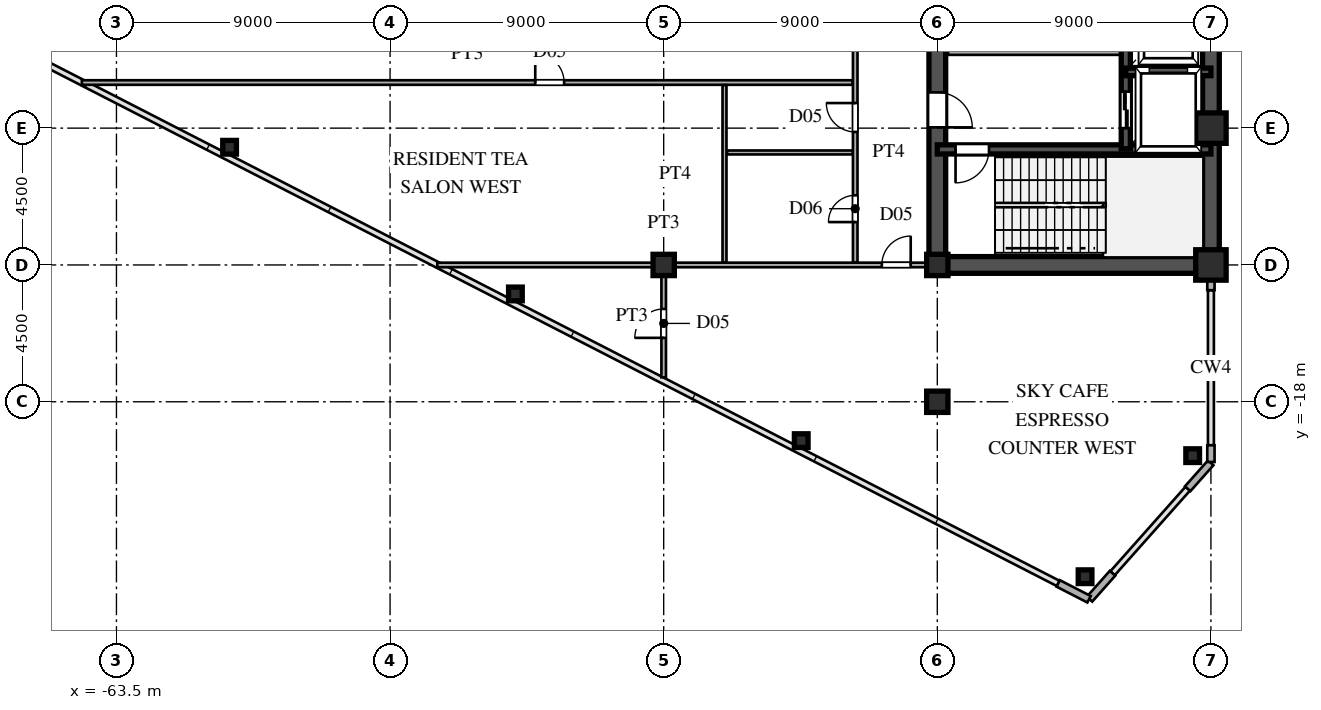
"""IFC4 building model, lengths in metres.
Left out: names, types, materials, properties, quantities, classifications, styles, units other than length and angle.
Written with IfcOpenShell. Run it as: python <this file> out.ifc"""

import sys

from ifc_helpers import new_model, si_unit, direction, frame, frame_2d, origin, origin_2d, place, context, subcontext, project, spatial, rectangle, hollow_rectangle, i_section, extrude, source, transform, mapped, element, fill, save


model = new_model("IFC4")
c1 = context("Model", 3, precision=1e-05, world=origin(), true_north=direction((0.0, 1.0)))
c2 = subcontext(c1, "Body", "Model", "MODEL_VIEW")
j1 = project(units=[si_unit("LENGTHUNIT", "METRE"), si_unit("PLANEANGLEUNIT", "RADIAN")], contexts=[c1])
p1 = place(None, origin())
s1 = spatial("IfcSite", under=j1, at=p1, CompositionType="ELEMENT")
p2 = place(p1, origin())
s2 = spatial("IfcBuilding", under=s1, at=p2, CompositionType="ELEMENT")
p3 = place(p2, frame((0.0, 0.0, 135.6)))
s3 = spatial("IfcBuildingStorey", under=s2, at=p3, CompositionType="ELEMENT", Elevation=135.6)
m1 = source(origin(), c2, "Body", "SweptSolid", [
    extrude(hollow_rectangle(XDim=1.0, YDim=1.0, WallThickness=0.042, at=origin_2d()), origin(), (0.0, 0.0, 1.0), 4.8),
])
for number, where, z_axis, x_axis in (
    (1, (-27.5, -13.5, 0.0), (0.0, 0.0, 1.0), (1.0, 0.0, 0.0)),
    (2, (-27.5, -9.0, 0.0), (0.0, 0.0, 1.0), (1.0, 0.0, 0.0)),
):
    element("IfcColumn", number, at=place(p3, frame(where, z_axis=z_axis, x_axis=x_axis)), inside=s3, PredefinedType="COLUMN", context=c2, shape_type="MappedRepresentation", body=[
        mapped(m1, transform((0.0, 0.0, 0.0), scale=1.0)),
    ])
m2 = source(origin(), c2, "Body", "SweptSolid", [
    extrude(i_section(OverallWidth=0.7, OverallDepth=0.7, WebThickness=0.028, FlangeThickness=0.045, at=origin_2d()), origin(), (0.0, 0.0, 1.0), 4.8),
])
for number, where, z_axis, x_axis in (
    (3, (-36.5, -18.0, 0.0), (0.0, 0.0, 1.0), (1.0, 0.0, 0.0)),
    (4, (-36.5, -13.5, 0.0), (0.0, 0.0, 1.0), (1.0, 0.0, 0.0)),
    (5, (-45.5, -13.5, 0.0), (0.0, 0.0, 1.0), (1.0, 0.0, 0.0)),
):
    element("IfcColumn", number, at=place(p3, frame(where, z_axis=z_axis, x_axis=x_axis)), inside=s3, PredefinedType="COLUMN", context=c2, shape_type="MappedRepresentation", body=[
        mapped(m2, transform((0.0, 0.0, 0.0), scale=1.0)),
    ])
m3 = source(origin(), c2, "Body", "SweptSolid", [
    extrude(hollow_rectangle(XDim=0.45, YDim=0.45, WallThickness=0.018, at=origin_2d()), origin(), (0.0, 0.0, 1.0), 4.8),
])
for number, where, z_axis, x_axis in (
    (6, (-28.1, -19.772, 0.0), (0.0, 0.0, 1.0), (1.0, 0.0, 0.0)),
    (7, (-31.64, -23.754, 0.0), (0.0, 0.0, 1.0), (1.0, 0.0, 0.0)),
    (8, (-40.976, -19.278, 0.0), (0.0, 0.0, 1.0), (1.0, 0.0, 0.0)),
    (9, (-50.377, -14.453, 0.0), (0.0, 0.0, 1.0), (1.0, 0.0, 0.0)),
    (10, (-59.779, -9.629, 0.0), (0.0, 0.0, 1.0), (1.0, 0.0, 0.0)),
):
    element("IfcColumn", number, at=place(p3, frame(where, z_axis=z_axis, x_axis=x_axis)), inside=s3, PredefinedType="COLUMN", context=c2, shape_type="MappedRepresentation", body=[
        mapped(m3, transform((0.0, 0.0, 0.0), scale=1.0)),
    ])
p4 = place(p3, frame((-27.5, -19.98, 0.0), z_axis=(0.0, 0.0, 1.0), x_axis=(0.0, 1.0, 0.0)))
e11 = element("IfcWall", 11, at=p4, inside=s3, PredefinedType="SOLIDWALL", context=c2, shape_type="SweptSolid", body=[
    extrude(rectangle(XDim=0.55, YDim=0.24, at=frame_2d((0.275, 0.0))), origin(), (0.0, 0.0, 1.0), 4.58),
])
p5 = place(p3, frame((-27.5, -14.33, 0.0), z_axis=(0.0, 0.0, 1.0), x_axis=(0.0, 1.0, 0.0)))
e12 = element("IfcWall", 12, at=p5, inside=s3, PredefinedType="SOLIDWALL", context=c2, shape_type="SweptSolid", body=[
    extrude(rectangle(XDim=0.55, YDim=0.24, at=frame_2d((0.275, 0.0))), origin(), (0.0, 0.0, 1.0), 4.08),
])
p6 = place(p3, frame((-32.523, -23.975, 0.0), z_axis=(0.0, 0.0, 1.0), x_axis=(0.889797395748, -0.456355776255, 0.0)))
e13 = element("IfcWall", 13, at=p6, inside=s3, PredefinedType="SOLIDWALL", context=c2, shape_type="SweptSolid", body=[
    extrude(rectangle(XDim=1.14, YDim=0.24, at=frame_2d((0.57, 0.0))), origin(), (0.0, 0.0, 1.0), 4.58),
])
for number, where, z_axis, x_axis in (
    (14, (-31.493, -24.492, 0.0), (0.0, 0.0, 1.0), (0.664, 0.747, 0.0)),
    (15, (-28.264, -20.86, 0.0), (0.0, 0.0, 1.0), (0.664, 0.747, 0.0)),
):
    element("IfcWall", number, at=place(p3, frame(where, z_axis=z_axis, x_axis=x_axis)), inside=s3, PredefinedType="SOLIDWALL", context=c2, shape_type="SweptSolid", body=[
        extrude(rectangle(XDim=1.14, YDim=0.24, at=frame_2d((0.57, 0.0))), origin(), (0.0, 0.0, 1.0), 4.58),
    ])
p7 = place(p3, frame((-27.5, -13.5, 0.0), z_axis=(0.0, 0.0, 1.0), x_axis=(0.0, 1.0, 0.0)))
e16 = element("IfcWall", 16, at=p7, inside=s3, PredefinedType="SHEAR", context=c2, shape_type="SweptSolid", body=[
    extrude(rectangle(XDim=12.2, YDim=0.55, at=frame_2d((6.1, 0.0))), origin(), (0.0, 0.0, 1.0), 4.58),
])
p8 = place(p3, frame((-36.5, -13.5, 0.0), z_axis=(0.0, 0.0, 1.0), x_axis=(1.0, 0.0, 0.0)))
e17 = element("IfcWall", 17, at=p8, inside=s3, PredefinedType="SHEAR", context=c2, shape_type="SweptSolid", body=[
    extrude(rectangle(XDim=9.0, YDim=0.55, at=frame_2d((4.5, 0.0))), origin(), (0.0, 0.0, 1.0), 4.58),
])
p9 = place(p3, frame((-36.5, -13.65, 0.0), z_axis=(0.0, 0.0, 1.0), x_axis=(0.0, 1.0, 0.0)))
e18 = element("IfcWall", 18, at=p9, inside=s3, PredefinedType="SHEAR", context=c2, shape_type="SweptSolid", body=[
    extrude(rectangle(XDim=7.15, YDim=0.55, at=frame_2d((3.575, 0.0))), origin(), (0.0, 0.0, 1.0), 4.58),
])
p10 = place(p9, frame((4.675, 0.0, 0.0)))
e19 = element("IfcOpeningElement", 19, at=p10, cuts=e18, PredefinedType="OPENING", context=c2, shape_type="SweptSolid", body=[
    extrude(rectangle(XDim=1.15, YDim=2.2, at=frame_2d((0.575, 1.1))), frame((0.0, 0.285, 0.0), z_axis=(0.0, -1.0, 0.0), x_axis=(1.0, 0.0, 0.0)), (0.0, 0.0, 1.0), 0.57),
])
p11 = place(p3, frame((-36.5, -9.7, 0.0), z_axis=(0.0, 0.0, 1.0), x_axis=(1.0, 0.0, 0.0)))
e20 = element("IfcWall", 20, at=p11, inside=s3, PredefinedType="SHEAR", context=c2, shape_type="SweptSolid", body=[
    extrude(rectangle(XDim=9.0, YDim=0.3, at=frame_2d((4.5, 0.0))), origin(), (0.0, 0.0, 1.0), 4.58),
])
p12 = place(p11, frame((0.6, 0.0, 0.0)))
e21 = element("IfcOpeningElement", 21, at=p12, cuts=e20, PredefinedType="OPENING", context=c2, shape_type="SweptSolid", body=[
    extrude(rectangle(XDim=1.1, YDim=2.2, at=frame_2d((0.55, 1.1))), frame((0.0, 0.16, 0.0), z_axis=(0.0, -1.0, 0.0), x_axis=(1.0, 0.0, 0.0)), (0.0, 0.0, 1.0), 0.32),
])
p13 = place(p3, frame((-30.3, -7.15, 0.0), z_axis=(0.0, 0.0, 1.0), x_axis=(1.0, 0.0, 0.0)))
e22 = element("IfcWall", 22, at=p13, inside=s3, PredefinedType="SHEAR", context=c2, shape_type="SweptSolid", body=[
    extrude(rectangle(XDim=2.8, YDim=0.25, at=frame_2d((1.4, 0.0))), origin(), (0.0, 0.0, 1.0), 4.58),
])
p14 = place(p3, frame((-30.3, -9.68, 0.0), z_axis=(0.0, 0.0, 1.0), x_axis=(0.0, 1.0, 0.0)))
e23 = element("IfcWall", 23, at=p14, inside=s3, PredefinedType="SHEAR", context=c2, shape_type="SweptSolid", body=[
    extrude(rectangle(XDim=2.56, YDim=0.3, at=frame_2d((1.28, 0.0))), origin(), (0.0, 0.0, 1.0), 4.58),
])
p15 = place(p14, frame((0.68, 0.0, 0.0)))
e24 = element("IfcOpeningElement", 24, at=p15, cuts=e23, PredefinedType="OPENING", context=c2, shape_type="SweptSolid", body=[
    extrude(rectangle(XDim=1.2, YDim=2.25, at=frame_2d((0.6, 1.125))), frame((0.0, 0.16, 0.0), z_axis=(0.0, -1.0, 0.0), x_axis=(1.0, 0.0, 0.0)), (0.0, 0.0, 1.0), 0.32),
])
p16 = place(p3, frame((-30.3, -7.12, 0.0), z_axis=(0.0, 0.0, 1.0), x_axis=(0.0, 1.0, 0.0)))
e25 = element("IfcWall", 25, at=p16, inside=s3, PredefinedType="SHEAR", context=c2, shape_type="SweptSolid", body=[
    extrude(rectangle(XDim=2.92, YDim=0.3, at=frame_2d((1.46, 0.0))), origin(), (0.0, 0.0, 1.0), 4.58),
])
p17 = place(p16, frame((0.91, 0.0, 0.0)))
e26 = element("IfcOpeningElement", 26, at=p17, cuts=e25, PredefinedType="OPENING", context=c2, shape_type="SweptSolid", body=[
    extrude(rectangle(XDim=1.1, YDim=2.2, at=frame_2d((0.55, 1.1))), frame((0.0, 0.16, 0.0), z_axis=(0.0, -1.0, 0.0), x_axis=(1.0, 0.0, 0.0)), (0.0, 0.0, 1.0), 0.32),
])
p18 = place(p3, frame((-36.15, -6.5, 0.0), z_axis=(0.0, 0.0, 1.0), x_axis=(1.0, 0.0, 0.0)))
e27 = element("IfcWall", 27, at=p18, inside=s3, PredefinedType="PARTITIONING", context=c2, shape_type="SweptSolid", body=[
    extrude(rectangle(XDim=5.7, YDim=0.18, at=frame_2d((2.85, 0.0))), origin(), (0.0, 0.0, 1.0), 4.58),
])
p19 = place(p3, frame((-52.947, -13.5, 0.0), z_axis=(0.0, 0.0, 1.0), x_axis=(1.0, 0.0, 0.0)))
e28 = element("IfcWall", 28, at=p19, inside=s3, PredefinedType="PARTITIONING", context=c2, shape_type="SweptSolid", body=[
    extrude(rectangle(XDim=16.167, YDim=0.15, at=frame_2d((8.083, 0.0))), origin(), (0.0, 0.0, 1.0), 3.98),
])
p20 = place(p19, frame((14.622, 0.0, 0.0)))
e29 = element("IfcOpeningElement", 29, at=p20, cuts=e28, PredefinedType="OPENING", context=c2, shape_type="SweptSolid", body=[
    extrude(rectangle(XDim=0.95, YDim=2.15, at=frame_2d((0.475, 1.075))), frame((0.0, 0.085, 0.0), z_axis=(0.0, -1.0, 0.0), x_axis=(1.0, 0.0, 0.0)), (0.0, 0.0, 1.0), 0.17),
])
p21 = place(p3, frame((-43.415, -9.8, 0.0), z_axis=(0.0, 0.0, 1.0), x_axis=(1.0, 0.0, 0.0)))
e30 = element("IfcWall", 30, at=p21, inside=s3, PredefinedType="PARTITIONING", context=c2, shape_type="SweptSolid", body=[
    extrude(rectangle(XDim=4.13, YDim=0.13, at=frame_2d((2.065, 0.0))), origin(), (0.0, 0.0, 1.0), 4.58),
])
p22 = place(p3, frame((-64.639, -7.5, 0.0), z_axis=(0.0, 0.0, 1.0), x_axis=(1.0, 0.0, 0.0)))
e31 = element("IfcWall", 31, at=p22, inside=s3, PredefinedType="PARTITIONING", context=c2, shape_type="SweptSolid", body=[
    extrude(rectangle(XDim=25.354, YDim=0.15, at=frame_2d((12.677, 0.0))), origin(), (0.0, 0.0, 1.0), 4.58),
])
p23 = place(p22, frame((14.914, 0.0, 0.0)))
e32 = element("IfcOpeningElement", 32, at=p23, cuts=e31, PredefinedType="OPENING", context=c2, shape_type="SweptSolid", body=[
    extrude(rectangle(XDim=0.95, YDim=2.15, at=frame_2d((0.475, 1.075))), frame((0.0, 0.085, 0.0), z_axis=(0.0, -1.0, 0.0), x_axis=(1.0, 0.0, 0.0)), (0.0, 0.0, 1.0), 0.17),
])
p24 = place(p3, frame((-45.5, -17.196, 0.0), z_axis=(0.0, 0.0, 1.0), x_axis=(0.0, 1.0, 0.0)))
e33 = element("IfcWall", 33, at=p24, inside=s3, PredefinedType="PARTITIONING", context=c2, shape_type="SweptSolid", body=[
    extrude(rectangle(XDim=3.611, YDim=0.15, at=frame_2d((1.806, 0.0))), origin(), (0.0, 0.0, 1.0), 4.58),
])
p25 = place(p24, frame((1.298, 0.0, 0.0)))
e34 = element("IfcOpeningElement", 34, at=p25, cuts=e33, PredefinedType="OPENING", context=c2, shape_type="SweptSolid", body=[
    extrude(rectangle(XDim=0.95, YDim=2.15, at=frame_2d((0.475, 1.075))), frame((0.0, 0.085, 0.0), z_axis=(0.0, -1.0, 0.0), x_axis=(1.0, 0.0, 0.0)), (0.0, 0.0, 1.0), 0.17),
])
p26 = place(p3, frame((-43.5, -13.415, 0.0), z_axis=(0.0, 0.0, 1.0), x_axis=(0.0, 1.0, 0.0)))
e35 = element("IfcWall", 35, at=p26, inside=s3, PredefinedType="PARTITIONING", context=c2, shape_type="SweptSolid", body=[
    extrude(rectangle(XDim=5.83, YDim=0.13, at=frame_2d((2.915, 0.0))), origin(), (0.0, 0.0, 1.0), 4.58),
])
p27 = place(p3, frame((-39.2, -13.415, 0.0), z_axis=(0.0, 0.0, 1.0), x_axis=(0.0, 1.0, 0.0)))
e36 = element("IfcWall", 36, at=p27, inside=s3, PredefinedType="PARTITIONING", context=c2, shape_type="SweptSolid", body=[
    extrude(rectangle(XDim=26.83, YDim=0.15, at=frame_2d((13.415, 0.0))), origin(), (0.0, 0.0, 1.0), 4.58),
])
p28 = place(p27, frame((12.94, 0.0, 0.0)))
e37 = element("IfcOpeningElement", 37, at=p28, cuts=e36, PredefinedType="OPENING", context=c2, shape_type="SweptSolid", body=[
    extrude(rectangle(XDim=0.95, YDim=2.15, at=frame_2d((0.475, 1.075))), frame((0.0, 0.085, 0.0), z_axis=(0.0, -1.0, 0.0), x_axis=(1.0, 0.0, 0.0)), (0.0, 0.0, 1.0), 0.17),
])
p29 = place(p27, frame((1.325, 0.0, 0.0)))
e38 = element("IfcOpeningElement", 38, at=p29, cuts=e36, PredefinedType="OPENING", context=c2, shape_type="SweptSolid", body=[
    extrude(rectangle(XDim=0.88, YDim=2.1, at=frame_2d((0.44, 1.05))), frame((0.0, 0.085, 0.0), z_axis=(0.0, -1.0, 0.0), x_axis=(1.0, 0.0, 0.0)), (0.0, 0.0, 1.0), 0.17),
])
p30 = place(p27, frame((4.29, 0.0, 0.0)))
e39 = element("IfcOpeningElement", 39, at=p30, cuts=e36, PredefinedType="OPENING", context=c2, shape_type="SweptSolid", body=[
    extrude(rectangle(XDim=0.95, YDim=2.15, at=frame_2d((0.475, 1.075))), frame((0.0, 0.085, 0.0), z_axis=(0.0, -1.0, 0.0), x_axis=(1.0, 0.0, 0.0)), (0.0, 0.0, 1.0), 0.17),
])
p31 = place(p27, frame((21.59, 0.0, 0.0)))
e40 = element("IfcOpeningElement", 40, at=p31, cuts=e36, PredefinedType="OPENING", context=c2, shape_type="SweptSolid", body=[
    extrude(rectangle(XDim=0.95, YDim=2.15, at=frame_2d((0.475, 1.075))), frame((0.0, 0.085, 0.0), z_axis=(0.0, -1.0, 0.0), x_axis=(1.0, 0.0, 0.0)), (0.0, 0.0, 1.0), 0.17),
])
p32 = place(p27, frame((24.625, 0.0, 0.0)))
e41 = element("IfcOpeningElement", 41, at=p32, cuts=e36, PredefinedType="OPENING", context=c2, shape_type="SweptSolid", body=[
    extrude(rectangle(XDim=0.88, YDim=2.1, at=frame_2d((0.44, 1.05))), frame((0.0, 0.085, 0.0), z_axis=(0.0, -1.0, 0.0), x_axis=(1.0, 0.0, 0.0)), (0.0, 0.0, 1.0), 0.17),
])
m4 = source(origin(), c2, "Body", "SweptSolid", [
    extrude(rectangle(XDim=1.15, YDim=2.2, at=frame_2d((0.575, 1.1))), frame((0.0, 0.025, 0.0), z_axis=(0.0, -1.0, 0.0), x_axis=(1.0, 0.0, 0.0)), (0.0, 0.0, 1.0), 0.05),
])
p33 = place(p10, frame((1.15, 0.0, 0.0), z_axis=(0.0, 0.0, 1.0), x_axis=(-1.0, 0.0, 0.0)))
e42 = element("IfcDoor", 42, at=p33, inside=s3, OperationType="SINGLE_SWING_LEFT", PredefinedType="DOOR", context=c2, shape_type="MappedRepresentation", body=[
    mapped(m4, transform((0.0, 0.0, 0.0), scale=1.0)),
])
fill(e19, e42)
m5 = source(origin(), c2, "Body", "SweptSolid", [
    extrude(rectangle(XDim=1.1, YDim=2.2, at=frame_2d((0.55, 1.1))), frame((0.0, 0.025, 0.0), z_axis=(0.0, -1.0, 0.0), x_axis=(1.0, 0.0, 0.0)), (0.0, 0.0, 1.0), 0.05),
])
p34 = place(p12, frame((1.1, 0.0, 0.0), z_axis=(0.0, 0.0, 1.0), x_axis=(-1.0, 0.0, 0.0)))
e43 = element("IfcDoor", 43, at=p34, inside=s3, OperationType="SINGLE_SWING_LEFT", PredefinedType="DOOR", context=c2, shape_type="MappedRepresentation", body=[
    mapped(m5, transform((0.0, 0.0, 0.0), scale=1.0)),
])
fill(e21, e43)
m6 = source(origin(), c2, "Body", "SweptSolid", [
    extrude(rectangle(XDim=1.2, YDim=2.25, at=frame_2d((0.6, 1.125))), frame((0.0, 0.025, 0.0), z_axis=(0.0, -1.0, 0.0), x_axis=(1.0, 0.0, 0.0)), (0.0, 0.0, 1.0), 0.05),
])
p35 = place(p15, origin())
e44 = element("IfcDoor", 44, at=p35, inside=s3, OperationType="DOUBLE_DOOR_SLIDING", PredefinedType="DOOR", context=c2, shape_type="MappedRepresentation", body=[
    mapped(m6, transform((0.0, 0.0, 0.0), scale=1.0)),
])
fill(e24, e44)
m7 = source(origin(), c2, "Body", "SweptSolid", [
    extrude(rectangle(XDim=0.95, YDim=2.15, at=frame_2d((0.475, 1.075))), frame((0.0, 0.025, 0.0), z_axis=(0.0, -1.0, 0.0), x_axis=(1.0, 0.0, 0.0)), (0.0, 0.0, 1.0), 0.05),
])
p36 = place(p20, origin())
e45 = element("IfcDoor", 45, at=p36, inside=s3, OperationType="SINGLE_SWING_RIGHT", PredefinedType="DOOR", context=c2, shape_type="MappedRepresentation", body=[
    mapped(m7, transform((0.0, 0.0, 0.0), scale=1.0)),
])
fill(e29, e45)
p37 = place(p23, origin())
e46 = element("IfcDoor", 46, at=p37, inside=s3, OperationType="SINGLE_SWING_LEFT", PredefinedType="DOOR", context=c2, shape_type="MappedRepresentation", body=[
    mapped(m7, transform((0.0, 0.0, 0.0), scale=1.0)),
])
fill(e32, e46)
p38 = place(p25, origin())
e47 = element("IfcDoor", 47, at=p38, inside=s3, OperationType="SINGLE_SWING_LEFT", PredefinedType="DOOR", context=c2, shape_type="MappedRepresentation", body=[
    mapped(m7, transform((0.0, 0.0, 0.0), scale=1.0)),
])
fill(e34, e47)
m8 = source(origin(), c2, "Body", "SweptSolid", [
    extrude(rectangle(XDim=0.88, YDim=2.1, at=frame_2d((0.44, 1.05))), frame((0.0, 0.025, 0.0), z_axis=(0.0, -1.0, 0.0), x_axis=(1.0, 0.0, 0.0)), (0.0, 0.0, 1.0), 0.05),
])
p39 = place(p29, origin())
e48 = element("IfcDoor", 48, at=p39, inside=s3, OperationType="SINGLE_SWING_LEFT", PredefinedType="DOOR", context=c2, shape_type="MappedRepresentation", body=[
    mapped(m8, transform((0.0, 0.0, 0.0), scale=1.0)),
])
fill(e38, e48)
p40 = place(p30, origin())
e49 = element("IfcDoor", 49, at=p40, inside=s3, OperationType="SINGLE_SWING_RIGHT", PredefinedType="DOOR", context=c2, shape_type="MappedRepresentation", body=[
    mapped(m7, transform((0.0, 0.0, 0.0), scale=1.0)),
])
fill(e39, e49)
save(model, sys.argv[1])
